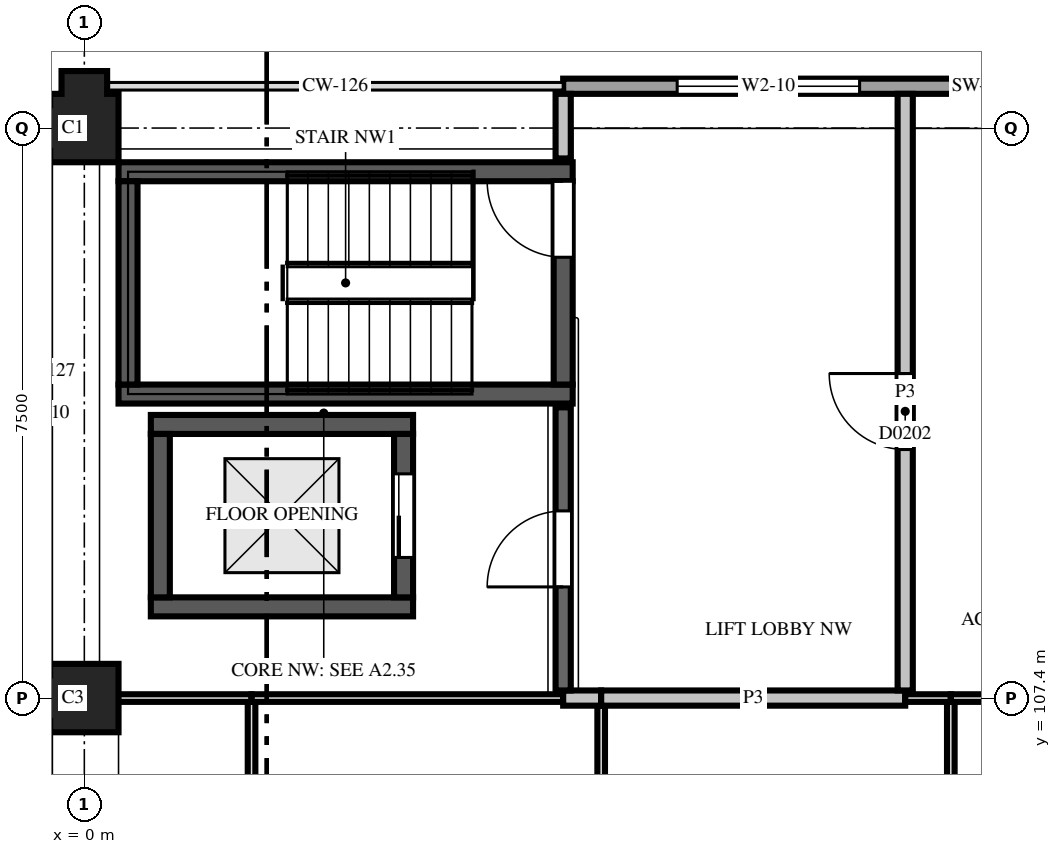
"""IFC4 building model, lengths in metres.
Left out: names, types, materials, properties, quantities, classifications, styles, units other than length and angle.
Written with IfcOpenShell. Run it as: python <this file> out.ifc"""

import sys

from ifc_helpers import new_model, si_unit, direction, frame, frame_2d, origin, place, context, subcontext, project, spatial, polyline, rectangle, outline, extrude, element, fill, save


model = new_model("IFC4")
c1 = context("Model", 3, precision=1e-05, world=origin(), true_north=direction((0.0, 1.0)))
c2 = subcontext(c1, "Body", "Model", "MODEL_VIEW")
j1 = project(units=[si_unit("LENGTHUNIT", "METRE"), si_unit("PLANEANGLEUNIT", "RADIAN")], contexts=[c1])
p1 = place(None, origin())
s1 = spatial("IfcSite", under=j1, at=p1, CompositionType="ELEMENT")
p2 = place(p1, origin())
s2 = spatial("IfcBuilding", under=s1, at=p2, CompositionType="ELEMENT")
p3 = place(p2, frame((0.0, 0.0, 8.2)))
s3 = spatial("IfcBuildingStorey", under=s2, at=p3, CompositionType="ELEMENT", Elevation=8.2)
p4 = place(p3, frame((0.0, 107.4, 0.0), z_axis=(0.0, 0.0, 1.0), x_axis=(-1.0, 0.0, 0.0)))
e1 = element("IfcColumn", 1, at=p4, inside=s3, PredefinedType="COLUMN", context=c2, shape_type="SweptSolid", body=[
    extrude(outline(polyline([(-0.45, -0.45), (0.45, -0.45), (0.45, -0.3), (0.75, -0.3), (0.75, 0.3), (0.45, 0.3), (0.45, 0.45), (-0.45, 0.45), (-0.45, -0.45)])), origin(), (0.0, 0.0, 1.0), 3.7),
])
p5 = place(p3, frame((0.0, 114.9, 0.0), z_axis=(0.0, 0.0, 1.0), x_axis=(0.0, 1.0, 0.0)))
e2 = element("IfcColumn", 2, at=p5, inside=s3, PredefinedType="COLUMN", context=c2, shape_type="SweptSolid", body=[
    extrude(outline(polyline([(-0.45, -0.45), (0.45, -0.45), (0.45, -0.3), (0.75, -0.3), (0.75, 0.3), (0.45, 0.3), (0.45, 0.45), (0.3, 0.45), (0.3, 0.75), (-0.3, 0.75), (-0.3, 0.45), (-0.45, 0.45), (-0.45, -0.45)])), origin(), (0.0, 0.0, 1.0), 3.7),
])
for number, where, z_axis, x_axis in (
    (3, (0.875, 108.6, 0.0), (0.0, 0.0, 1.0), (1.0, 0.0, 0.0)),
    (4, (0.875, 111.0, 0.0), (0.0, 0.0, 1.0), (1.0, 0.0, 0.0)),
):
    element("IfcWall", number, at=place(p3, frame(where, z_axis=z_axis, x_axis=x_axis)), inside=s3, PredefinedType="SHEAR", context=c2, shape_type="SweptSolid", body=[
        extrude(rectangle(XDim=3.45, YDim=0.25, at=frame_2d((1.725, 0.0))), origin(), (0.0, 0.0, 1.0), 3.7),
    ])
for number, where, z_axis, x_axis in (
    (5, (0.45, 111.4, 0.0), (0.0, 0.0, 1.0), (1.0, 0.0, 0.0)),
    (6, (0.45, 114.325, 0.0), (0.0, 0.0, 1.0), (1.0, 0.0, 0.0)),
):
    element("IfcWall", number, at=place(p3, frame(where, z_axis=z_axis, x_axis=x_axis)), inside=s3, PredefinedType="SHEAR", context=c2, shape_type="SweptSolid", body=[
        extrude(rectangle(XDim=5.975, YDim=0.25, at=frame_2d((2.988, 0.0))), origin(), (0.0, 0.0, 1.0), 3.7),
    ])
p6 = place(p3, frame((0.575, 111.525, 0.0), z_axis=(0.0, 0.0, 1.0), x_axis=(0.0, 1.0, 0.0)))
e7 = element("IfcWall", 7, at=p6, inside=s3, PredefinedType="SHEAR", context=c2, shape_type="SweptSolid", body=[
    extrude(rectangle(XDim=2.675, YDim=0.25, at=frame_2d((1.337, 0.0))), origin(), (0.0, 0.0, 1.0), 3.7),
])
p7 = place(p3, frame((1.0, 108.725, 0.0), z_axis=(0.0, 0.0, 1.0), x_axis=(0.0, 1.0, 0.0)))
e8 = element("IfcWall", 8, at=p7, inside=s3, PredefinedType="SHEAR", context=c2, shape_type="SweptSolid", body=[
    extrude(rectangle(XDim=2.15, YDim=0.25, at=frame_2d((1.075, 0.0))), origin(), (0.0, 0.0, 1.0), 3.7),
])
p8 = place(p3, frame((4.2, 108.725, 0.0), z_axis=(0.0, 0.0, 1.0), x_axis=(0.0, 1.0, 0.0)))
e9 = element("IfcWall", 9, at=p8, inside=s3, PredefinedType="SHEAR", context=c2, shape_type="SweptSolid", body=[
    extrude(rectangle(XDim=2.15, YDim=0.25, at=frame_2d((1.075, 0.0))), origin(), (0.0, 0.0, 1.0), 3.7),
])
p9 = place(p8, frame((0.525, 0.0, 0.0)))
e10 = element("IfcOpeningElement", 10, at=p9, cuts=e9, PredefinedType="OPENING", context=c2, shape_type="SweptSolid", body=[
    extrude(rectangle(XDim=1.1, YDim=2.1, at=frame_2d((0.55, 1.05))), frame((0.0, 0.135, 0.0), z_axis=(0.0, -1.0, 0.0), x_axis=(1.0, 0.0, 0.0)), (0.0, 0.0, 1.0), 0.27),
])
p10 = place(p3, frame((6.3, 111.525, 0.0), z_axis=(0.0, 0.0, 1.0), x_axis=(0.0, 1.0, 0.0)))
e11 = element("IfcWall", 11, at=p10, inside=s3, PredefinedType="SHEAR", context=c2, shape_type="SweptSolid", body=[
    extrude(rectangle(XDim=2.675, YDim=0.25, at=frame_2d((1.337, 0.0))), origin(), (0.0, 0.0, 1.0), 3.7),
])
p11 = place(p10, frame((1.675, 0.0, 0.0)))
e12 = element("IfcOpeningElement", 12, at=p11, cuts=e11, PredefinedType="OPENING", context=c2, shape_type="SweptSolid", body=[
    extrude(rectangle(XDim=1.0, YDim=2.1, at=frame_2d((0.5, 1.05))), frame((0.0, 0.135, 0.0), z_axis=(0.0, -1.0, 0.0), x_axis=(1.0, 0.0, 0.0)), (0.0, 0.0, 1.0), 0.27),
])
p12 = place(p3, frame((17.1, 115.45, 0.0), z_axis=(0.0, 0.0, 1.0), x_axis=(-1.0, 0.0, 0.0)))
e13 = element("IfcWall", 13, at=p12, inside=s3, PredefinedType="SOLIDWALL", context=c2, shape_type="SweptSolid", body=[
    extrude(rectangle(XDim=10.8, YDim=0.2, at=frame_2d((5.4, 0.0))), origin(), (0.0, 0.0, 1.0), 1.7),
])
p13 = place(p12, frame((1.5, 0.0, 0.55)))
e14 = element("IfcOpeningElement", 14, at=p13, cuts=e13, PredefinedType="OPENING", context=c2, shape_type="SweptSolid", body=[
    extrude(rectangle(XDim=2.4, YDim=1.0, at=frame_2d((1.2, 0.5))), frame((0.0, 0.11, 0.0), z_axis=(0.0, -1.0, 0.0), x_axis=(1.0, 0.0, 0.0)), (0.0, 0.0, 1.0), 0.22),
])
p14 = place(p12, frame((6.9, 0.0, 0.55)))
e15 = element("IfcOpeningElement", 15, at=p14, cuts=e13, PredefinedType="OPENING", context=c2, shape_type="SweptSolid", body=[
    extrude(rectangle(XDim=2.4, YDim=1.0, at=frame_2d((1.2, 0.5))), frame((0.0, 0.11, 0.0), z_axis=(0.0, -1.0, 0.0), x_axis=(1.0, 0.0, 0.0)), (0.0, 0.0, 1.0), 0.22),
])
p15 = place(p3, frame((2.2, 102.375, 0.0), z_axis=(0.0, 0.0, 1.0), x_axis=(0.0, 1.0, 0.0)))
e16 = element("IfcWall", 16, at=p15, inside=s3, PredefinedType="PARTITIONING", context=c2, shape_type="SweptSolid", body=[
    extrude(rectangle(XDim=4.975, YDim=0.1, at=frame_2d((2.488, 0.0))), origin(), (0.0, 0.0, 1.0), 2.88),
])
p16 = place(p3, frame((6.8, 102.35, 0.0), z_axis=(0.0, 0.0, 1.0), x_axis=(0.0, 1.0, 0.0)))
e17 = element("IfcWall", 17, at=p16, inside=s3, PredefinedType="PARTITIONING", context=c2, shape_type="SweptSolid", body=[
    extrude(rectangle(XDim=4.95, YDim=0.1, at=frame_2d((2.475, 0.0))), origin(), (0.0, 0.0, 1.0), 2.88),
])
p17 = place(p3, frame((11.4, 102.35, 0.0), z_axis=(0.0, 0.0, 1.0), x_axis=(0.0, 1.0, 0.0)))
e18 = element("IfcWall", 18, at=p17, inside=s3, PredefinedType="PARTITIONING", context=c2, shape_type="SweptSolid", body=[
    extrude(rectangle(XDim=5.0, YDim=0.1, at=frame_2d((2.5, 0.0))), origin(), (0.0, 0.0, 1.0), 2.88),
])
p18 = place(p3, frame((2.2, 107.4, 0.0), z_axis=(0.0, 0.0, 1.0), x_axis=(-1.0, 0.0, 0.0)))
e19 = element("IfcWall", 19, at=p18, inside=s3, PredefinedType="PARTITIONING", context=c2, shape_type="SweptSolid", body=[
    extrude(rectangle(XDim=2.14, YDim=0.1, at=frame_2d((1.07, 0.0))), origin(), (0.0, 0.0, 1.0), 2.88),
])
p19 = place(p3, frame((6.3, 107.4, 0.0), z_axis=(0.0, 0.0, 1.0), x_axis=(-1.0, 0.0, 0.0)))
e20 = element("IfcWall", 20, at=p19, inside=s3, PredefinedType="PARTITIONING", context=c2, shape_type="SweptSolid", body=[
    extrude(rectangle(XDim=4.1, YDim=0.1, at=frame_2d((2.05, 0.0))), origin(), (0.0, 0.0, 1.0), 2.88),
])
p20 = place(p3, frame((6.3, 107.4, 0.0), z_axis=(0.0, 0.0, 1.0), x_axis=(1.0, 0.0, 0.0)))
e21 = element("IfcWall", 21, at=p20, inside=s3, PredefinedType="PARTITIONING", context=c2, shape_type="SweptSolid", body=[
    extrude(rectangle(XDim=0.5, YDim=0.2, at=frame_2d((0.25, 0.0))), origin(), (0.0, 0.0, 1.0), 2.88),
])
p21 = place(p3, frame((6.8, 107.4, 0.0), z_axis=(0.0, 0.0, 1.0), x_axis=(1.0, 0.0, 0.0)))
e22 = element("IfcWall", 22, at=p21, inside=s3, PredefinedType="PARTITIONING", context=c2, shape_type="SweptSolid", body=[
    extrude(rectangle(XDim=4.0, YDim=0.2, at=frame_2d((2.0, 0.0))), origin(), (0.0, 0.0, 1.0), 2.88),
])
p22 = place(p3, frame((10.8, 107.5, 0.0), z_axis=(0.0, 0.0, 1.0), x_axis=(0.0, 1.0, 0.0)))
e23 = element("IfcWall", 23, at=p22, inside=s3, PredefinedType="PARTITIONING", context=c2, shape_type="SweptSolid", body=[
    extrude(rectangle(XDim=7.85, YDim=0.2, at=frame_2d((3.925, 0.0))), origin(), (0.0, 0.0, 1.0), 2.88),
])
p23 = place(p22, frame((3.17, 0.0, 0.0)))
e24 = element("IfcOpeningElement", 24, at=p23, cuts=e23, PredefinedType="OPENING", context=c2, shape_type="SweptSolid", body=[
    extrude(rectangle(XDim=1.0, YDim=2.1, at=frame_2d((0.5, 1.05))), frame((0.0, 0.11, 0.0), z_axis=(0.0, -1.0, 0.0), x_axis=(1.0, 0.0, 0.0)), (0.0, 0.0, 1.0), 0.22),
])
p24 = place(p3, frame((11.4, 107.4, 0.0), z_axis=(0.0, 0.0, 1.0), x_axis=(-1.0, 0.0, 0.0)))
e25 = element("IfcWall", 25, at=p24, inside=s3, PredefinedType="PARTITIONING", context=c2, shape_type="SweptSolid", body=[
    extrude(rectangle(XDim=0.6, YDim=0.1, at=frame_2d((0.3, 0.0))), origin(), (0.0, 0.0, 1.0), 2.88),
])
p25 = place(p3, frame((14.45, 107.4, 0.0), z_axis=(0.0, 0.0, 1.0), x_axis=(-1.0, 0.0, 0.0)))
e26 = element("IfcWall", 26, at=p25, inside=s3, PredefinedType="PARTITIONING", context=c2, shape_type="SweptSolid", body=[
    extrude(rectangle(XDim=3.05, YDim=0.1, at=frame_2d((1.525, 0.0))), origin(), (0.0, 0.0, 1.0), 2.88),
])
p26 = place(p3, frame((6.3, 111.225, 0.0), z_axis=(0.0, 0.0, 1.0), x_axis=(0.0, -1.0, 0.0)))
e27 = element("IfcWall", 27, at=p26, inside=s3, PredefinedType="PARTITIONING", context=c2, shape_type="SweptSolid", body=[
    extrude(rectangle(XDim=3.725, YDim=0.2, at=frame_2d((1.863, 0.0))), origin(), (0.0, 0.0, 1.0), 2.88),
])
p27 = place(p26, frame((1.363, 0.0, 0.0)))
e28 = element("IfcOpeningElement", 28, at=p27, cuts=e27, PredefinedType="OPENING", context=c2, shape_type="SweptSolid", body=[
    extrude(rectangle(XDim=1.0, YDim=2.1, at=frame_2d((0.5, 1.05))), frame((0.0, 0.11, 0.0), z_axis=(0.0, -1.0, 0.0), x_axis=(1.0, 0.0, 0.0)), (0.0, 0.0, 1.0), 0.22),
])
p28 = place(p3, frame((6.3, 115.35, 0.0), z_axis=(0.0, 0.0, 1.0), x_axis=(0.0, -1.0, 0.0)))
e29 = element("IfcWall", 29, at=p28, inside=s3, PredefinedType="PARTITIONING", context=c2, shape_type="SweptSolid", body=[
    extrude(rectangle(XDim=0.85, YDim=0.2, at=frame_2d((0.425, 0.0))), origin(), (0.0, 0.0, 1.0), 2.88),
])
p29 = place(p14, origin())
e30 = element("IfcWindow", 30, at=p29, inside=s3, PartitioningType="SINGLE_PANEL", PredefinedType="WINDOW", context=c2, shape_type="SweptSolid", body=[
    extrude(rectangle(XDim=2.4, YDim=1.0, at=frame_2d((1.2, 0.5))), frame((0.0, 0.03, 0.0), z_axis=(0.0, -1.0, 0.0), x_axis=(1.0, 0.0, 0.0)), (0.0, 0.0, 1.0), 0.06),
])
fill(e15, e30)
p30 = place(p23, origin())
e31 = element("IfcDoor", 31, at=p30, inside=s3, OperationType="SINGLE_SWING_LEFT", PredefinedType="DOOR", context=c2, shape_type="SweptSolid", body=[
    extrude(rectangle(XDim=1.0, YDim=2.1, at=frame_2d((0.5, 1.05))), frame((0.0, 0.025, 0.0), z_axis=(0.0, -1.0, 0.0), x_axis=(1.0, 0.0, 0.0)), (0.0, 0.0, 1.0), 0.05),
])
fill(e24, e31)
p31 = place(p9, origin())
e32 = element("IfcDoor", 32, at=p31, inside=s3, OperationType="SLIDING_TO_LEFT", PredefinedType="DOOR", context=c2, shape_type="SweptSolid", body=[
    extrude(rectangle(XDim=1.1, YDim=2.1, at=frame_2d((0.55, 1.05))), frame((0.0, 0.025, 0.0), z_axis=(0.0, -1.0, 0.0), x_axis=(1.0, 0.0, 0.0)), (0.0, 0.0, 1.0), 0.05),
])
fill(e10, e32)
p32 = place(p11, origin())
e33 = element("IfcDoor", 33, at=p32, inside=s3, OperationType="SINGLE_SWING_LEFT", PredefinedType="DOOR", context=c2, shape_type="SweptSolid", body=[
    extrude(rectangle(XDim=1.0, YDim=2.1, at=frame_2d((0.5, 1.05))), frame((0.0, 0.025, 0.0), z_axis=(0.0, -1.0, 0.0), x_axis=(1.0, 0.0, 0.0)), (0.0, 0.0, 1.0), 0.05),
])
fill(e12, e33)
p33 = place(p27, origin())
e34 = element("IfcDoor", 34, at=p33, inside=s3, OperationType="SINGLE_SWING_RIGHT", PredefinedType="DOOR", context=c2, shape_type="SweptSolid", body=[
    extrude(rectangle(XDim=1.0, YDim=2.1, at=frame_2d((0.5, 1.05))), frame((0.0, 0.025, 0.0), z_axis=(0.0, -1.0, 0.0), x_axis=(1.0, 0.0, 0.0)), (0.0, 0.0, 1.0), 0.05),
])
fill(e28, e34)
save(model, sys.argv[1])
